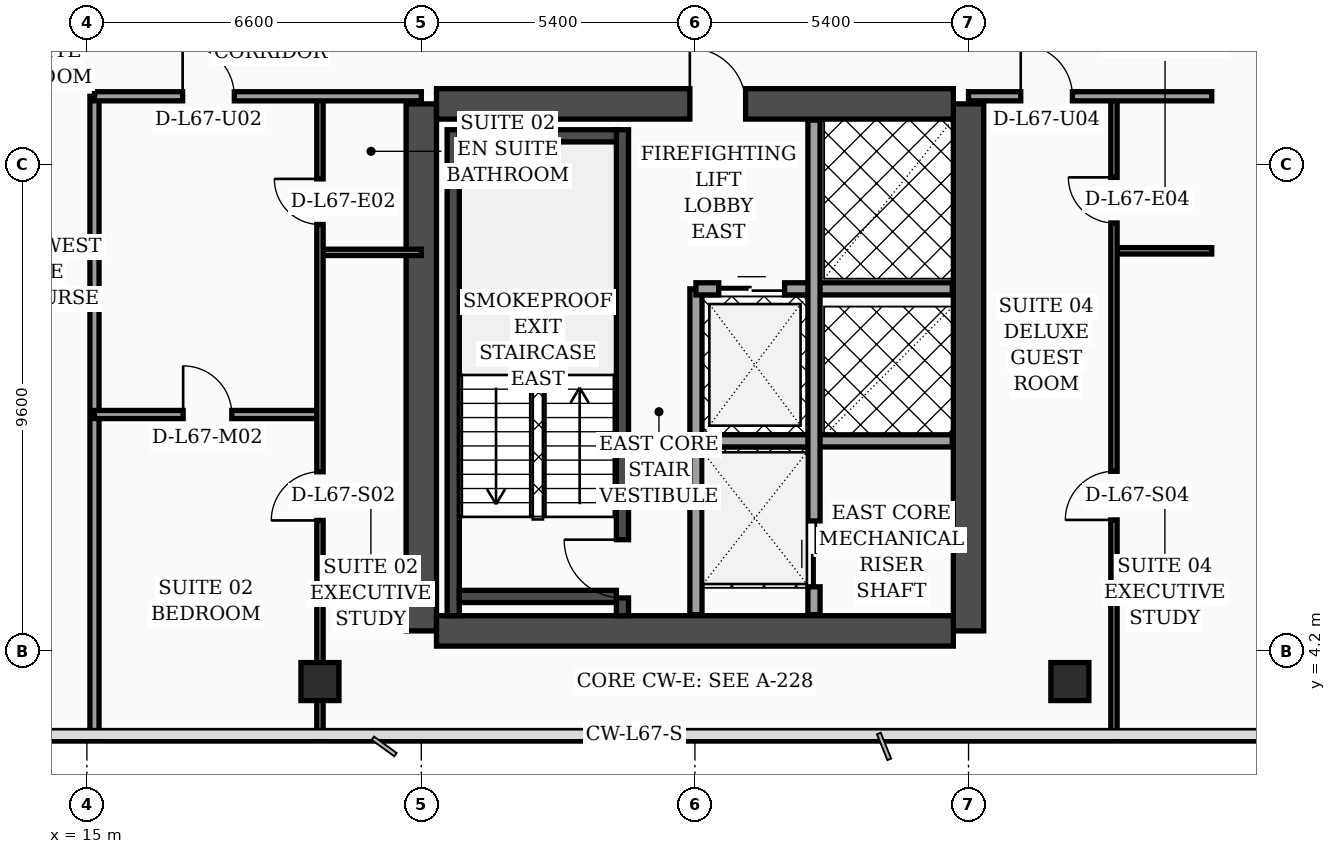
"""IFC4 building model, lengths in metres.
Left out: names, types, materials, properties, quantities, classifications, styles, units other than length and angle.
Written with IfcOpenShell. Run it as: python <this file> out.ifc"""

import sys

from ifc_helpers import new_model, si_unit, direction, frame, frame_2d, origin, origin_2d, place, context, subcontext, project, spatial, rectangle, hollow_rectangle, extrude, element, fill, save


model = new_model("IFC4")
c1 = context("Model", 3, precision=1e-05, world=origin(), true_north=direction((0.0, 1.0)))
c2 = subcontext(c1, "Body", "Model", "MODEL_VIEW")
j1 = project(units=[si_unit("LENGTHUNIT", "METRE"), si_unit("PLANEANGLEUNIT", "RADIAN")], contexts=[c1])
p1 = place(None, origin())
s1 = spatial("IfcSite", under=j1, at=p1, CompositionType="ELEMENT")
p2 = place(p1, origin())
s2 = spatial("IfcBuilding", under=s1, at=p2, CompositionType="ELEMENT")
p3 = place(p2, frame((0.0, 0.0, 271.1)))
s3 = spatial("IfcBuildingStorey", under=s2, at=p3, CompositionType="ELEMENT", Elevation=271.1)
for number, where, z_axis, x_axis in (
    (1, (21.6, 4.6, 0.0), (0.0, 0.0, 1.0), (0.0, 1.0, 0.0)),
    (2, (32.4, 4.6, 0.0), (0.0, 0.0, 1.0), (0.0, 1.0, 0.0)),
):
    element("IfcWall", number, at=place(p3, frame(where, z_axis=z_axis, x_axis=x_axis)), inside=s3, PredefinedType="SHEAR", context=c2, shape_type="SweptSolid", body=[
        extrude(rectangle(XDim=10.4, YDim=0.6, at=frame_2d((5.2, 0.0))), origin(), (0.0, 0.0, 1.0), 3.56),
    ])
p4 = place(p3, frame((21.9, 15.0, 0.0), z_axis=(0.0, 0.0, 1.0), x_axis=(1.0, 0.0, 0.0)))
e3 = element("IfcWall", 3, at=p4, inside=s3, PredefinedType="SHEAR", context=c2, shape_type="SweptSolid", body=[
    extrude(rectangle(XDim=10.2, YDim=0.6, at=frame_2d((5.1, 0.0))), origin(), (0.0, 0.0, 1.0), 3.56),
])
p5 = place(p4, frame((5.0, 0.0, 0.0)))
e4 = element("IfcOpeningElement", 4, at=p5, cuts=e3, PredefinedType="OPENING", context=c2, shape_type="SweptSolid", body=[
    extrude(rectangle(XDim=1.1, YDim=2.2, at=frame_2d((0.55, 1.1))), frame((0.0, 0.31, 0.0), z_axis=(0.0, -1.0, 0.0), x_axis=(1.0, 0.0, 0.0)), (0.0, 0.0, 1.0), 0.62),
])
p6 = place(p3, frame((21.9, 4.6, 0.0), z_axis=(0.0, 0.0, 1.0), x_axis=(1.0, 0.0, 0.0)))
e5 = element("IfcWall", 5, at=p6, inside=s3, PredefinedType="SHEAR", context=c2, shape_type="SweptSolid", body=[
    extrude(rectangle(XDim=10.2, YDim=0.6, at=frame_2d((5.1, 0.0))), origin(), (0.0, 0.0, 1.0), 3.56),
])
p7 = place(p3, frame((22.23, 4.9, 0.0), z_axis=(0.0, 0.0, 1.0), x_axis=(0.0, 1.0, 0.0)))
e6 = element("IfcWall", 6, at=p7, inside=s3, PredefinedType="SOLIDWALL", context=c2, shape_type="SweptSolid", body=[
    extrude(rectangle(XDim=9.59, YDim=0.24, at=frame_2d((4.795, 0.0))), origin(), (0.0, 0.0, 1.0), 3.56),
])
p8 = place(p3, frame((25.57, 4.9, 0.0), z_axis=(0.0, 0.0, 1.0), x_axis=(0.0, 1.0, 0.0)))
e7 = element("IfcWall", 7, at=p8, inside=s3, PredefinedType="SOLIDWALL", context=c2, shape_type="SweptSolid", body=[
    extrude(rectangle(XDim=9.59, YDim=0.24, at=frame_2d((4.795, 0.0))), origin(), (0.0, 0.0, 1.0), 3.56),
])
p9 = place(p8, frame((0.35, 0.0, 0.0)))
e8 = element("IfcOpeningElement", 8, at=p9, cuts=e7, PredefinedType="OPENING", context=c2, shape_type="SweptSolid", body=[
    extrude(rectangle(XDim=1.15, YDim=2.2, at=frame_2d((0.575, 1.1))), frame((0.0, 0.13, 0.0), z_axis=(0.0, -1.0, 0.0), x_axis=(1.0, 0.0, 0.0)), (0.0, 0.0, 1.0), 0.26),
])
for number, where, z_axis, x_axis in (
    (9, (22.35, 5.28, 0.0), (0.0, 0.0, 1.0), (1.0, 0.0, 0.0)),
    (10, (22.35, 14.37, 0.0), (0.0, 0.0, 1.0), (1.0, 0.0, 0.0)),
):
    element("IfcWall", number, at=place(p3, frame(where, z_axis=z_axis, x_axis=x_axis)), inside=s3, PredefinedType="SOLIDWALL", context=c2, shape_type="SweptSolid", body=[
        extrude(rectangle(XDim=3.1, YDim=0.24, at=frame_2d((1.55, 0.0))), origin(), (0.0, 0.0, 1.0), 3.56),
    ])
for number, where, z_axis, x_axis in (
    (11, (19.6, 3.6, 0.0), (0.0, 0.0, 1.0), (1.0, 0.0, 0.0)),
    (12, (34.4, 3.6, 0.0), (0.0, 0.0, 1.0), (1.0, 0.0, 0.0)),
):
    element("IfcColumn", number, at=place(p3, frame(where, z_axis=z_axis, x_axis=x_axis)), inside=s3, PredefinedType="COLUMN", context=c2, shape_type="SweptSolid", body=[
        extrude(hollow_rectangle(XDim=0.75, YDim=0.75, WallThickness=0.032, at=origin_2d()), origin(), (0.0, 0.0, 1.0), 3.56),
    ])
p10 = place(p3, frame((43.83, 5.505, 0.0), z_axis=(0.0, 0.0, 1.0), x_axis=(-0.300509063924, 0.953778958931, 0.0)))
e13 = element("IfcWall", 13, at=p10, inside=s3, PredefinedType="SOLIDWALL", context=c2, shape_type="SweptSolid", body=[
    extrude(rectangle(XDim=30.814, YDim=0.32, at=frame_2d((15.407, 0.0))), origin(), (0.0, 0.0, 1.0), 3.56),
])
p11 = place(p10, frame((10.199, 0.0, 0.0)))
e14 = element("IfcOpeningElement", 14, at=p11, cuts=e13, PredefinedType="OPENING", context=c2, shape_type="SweptSolid", body=[
    extrude(rectangle(XDim=1.4, YDim=2.25, at=frame_2d((0.7, 1.125))), frame((0.0, 0.17, 0.0), z_axis=(0.0, -1.0, 0.0), x_axis=(1.0, 0.0, 0.0)), (0.0, 0.0, 1.0), 0.34),
])
p12 = place(p10, frame((4.437, 0.0, 0.7)))
e15 = element("IfcOpeningElement", 15, at=p12, cuts=e13, PredefinedType="OPENING", context=c2, shape_type="SweptSolid", body=[
    extrude(rectangle(XDim=1.6, YDim=1.65, at=frame_2d((0.8, 0.825))), frame((0.0, 0.17, 0.0), z_axis=(0.0, -1.0, 0.0), x_axis=(1.0, 0.0, 0.0)), (0.0, 0.0, 1.0), 0.34),
])
p13 = place(p10, frame((18.696, 0.0, 0.7)))
e16 = element("IfcOpeningElement", 16, at=p13, cuts=e13, PredefinedType="OPENING", context=c2, shape_type="SweptSolid", body=[
    extrude(rectangle(XDim=1.6, YDim=1.65, at=frame_2d((0.8, 0.825))), frame((0.0, 0.17, 0.0), z_axis=(0.0, -1.0, 0.0), x_axis=(1.0, 0.0, 0.0)), (0.0, 0.0, 1.0), 0.34),
])
p14 = place(p10, frame((1.6, 0.0, 0.75)))
e17 = element("IfcOpeningElement", 17, at=p14, cuts=e13, PredefinedType="OPENING", context=c2, shape_type="SweptSolid", body=[
    extrude(rectangle(XDim=1.5, YDim=1.6, at=frame_2d((0.75, 0.8))), frame((0.0, 0.17, 0.0), z_axis=(0.0, -1.0, 0.0), x_axis=(1.0, 0.0, 0.0)), (0.0, 0.0, 1.0), 0.34),
])
p15 = place(p10, frame((7.8, 0.0, 0.75)))
e18 = element("IfcOpeningElement", 18, at=p15, cuts=e13, PredefinedType="OPENING", context=c2, shape_type="SweptSolid", body=[
    extrude(rectangle(XDim=1.5, YDim=1.6, at=frame_2d((0.75, 0.8))), frame((0.0, 0.17, 0.0), z_axis=(0.0, -1.0, 0.0), x_axis=(1.0, 0.0, 0.0)), (0.0, 0.0, 1.0), 0.34),
])
p16 = place(p10, frame((14.0, 0.0, 0.75)))
e19 = element("IfcOpeningElement", 19, at=p16, cuts=e13, PredefinedType="OPENING", context=c2, shape_type="SweptSolid", body=[
    extrude(rectangle(XDim=1.5, YDim=1.6, at=frame_2d((0.75, 0.8))), frame((0.0, 0.17, 0.0), z_axis=(0.0, -1.0, 0.0), x_axis=(1.0, 0.0, 0.0)), (0.0, 0.0, 1.0), 0.34),
])
p17 = place(p10, frame((16.55, 0.0, 0.75)))
e20 = element("IfcOpeningElement", 20, at=p17, cuts=e13, PredefinedType="OPENING", context=c2, shape_type="SweptSolid", body=[
    extrude(rectangle(XDim=1.5, YDim=1.6, at=frame_2d((0.75, 0.8))), frame((0.0, 0.17, 0.0), z_axis=(0.0, -1.0, 0.0), x_axis=(1.0, 0.0, 0.0)), (0.0, 0.0, 1.0), 0.34),
])
p18 = place(p10, frame((20.75, 0.0, 0.75)))
e21 = element("IfcOpeningElement", 21, at=p18, cuts=e13, PredefinedType="OPENING", context=c2, shape_type="SweptSolid", body=[
    extrude(rectangle(XDim=1.5, YDim=1.6, at=frame_2d((0.75, 0.8))), frame((0.0, 0.17, 0.0), z_axis=(0.0, -1.0, 0.0), x_axis=(1.0, 0.0, 0.0)), (0.0, 0.0, 1.0), 0.34),
])
p19 = place(p10, frame((23.3, 0.0, 0.75)))
e22 = element("IfcOpeningElement", 22, at=p19, cuts=e13, PredefinedType="OPENING", context=c2, shape_type="SweptSolid", body=[
    extrude(rectangle(XDim=1.5, YDim=1.6, at=frame_2d((0.75, 0.8))), frame((0.0, 0.17, 0.0), z_axis=(0.0, -1.0, 0.0), x_axis=(1.0, 0.0, 0.0)), (0.0, 0.0, 1.0), 0.34),
])
p20 = place(p10, frame((26.4, 0.0, 0.75)))
e23 = element("IfcOpeningElement", 23, at=p20, cuts=e13, PredefinedType="OPENING", context=c2, shape_type="SweptSolid", body=[
    extrude(rectangle(XDim=1.5, YDim=1.6, at=frame_2d((0.75, 0.8))), frame((0.0, 0.17, 0.0), z_axis=(0.0, -1.0, 0.0), x_axis=(1.0, 0.0, 0.0)), (0.0, 0.0, 1.0), 0.34),
])
p21 = place(p3, frame((27.02, 4.92, 0.0), z_axis=(0.0, 0.0, 1.0), x_axis=(0.0, 1.0, 0.0)))
e24 = element("IfcWall", 24, at=p21, inside=s3, PredefinedType="SOLIDWALL", context=c2, shape_type="SweptSolid", body=[
    extrude(rectangle(XDim=6.43, YDim=0.24, at=frame_2d((3.215, 0.0))), origin(), (0.0, 0.0, 1.0), 3.56),
])
p22 = place(p3, frame((27.02, 11.35, 0.0), z_axis=(0.0, 0.0, 1.0), x_axis=(1.0, 0.0, 0.0)))
e25 = element("IfcWall", 25, at=p22, inside=s3, PredefinedType="SOLIDWALL", context=c2, shape_type="SweptSolid", body=[
    extrude(rectangle(XDim=5.06, YDim=0.24, at=frame_2d((2.53, 0.0))), origin(), (0.0, 0.0, 1.0), 3.56),
])
p23 = place(p22, frame((0.45, 0.0, 0.0)))
e26 = element("IfcOpeningElement", 26, at=p23, cuts=e25, PredefinedType="OPENING", context=c2, shape_type="SweptSolid", body=[
    extrude(rectangle(XDim=1.3, YDim=2.35, at=frame_2d((0.65, 1.175))), frame((0.0, 0.13, 0.0), z_axis=(0.0, -1.0, 0.0), x_axis=(1.0, 0.0, 0.0)), (0.0, 0.0, 1.0), 0.26),
])
p24 = place(p3, frame((27.02, 8.35, 0.0), z_axis=(0.0, 0.0, 1.0), x_axis=(1.0, 0.0, 0.0)))
e27 = element("IfcWall", 27, at=p24, inside=s3, PredefinedType="SOLIDWALL", context=c2, shape_type="SweptSolid", body=[
    extrude(rectangle(XDim=5.06, YDim=0.24, at=frame_2d((2.53, 0.0))), origin(), (0.0, 0.0, 1.0), 3.56),
])
p25 = place(p3, frame((29.35, 4.92, 0.0), z_axis=(0.0, 0.0, 1.0), x_axis=(0.0, 1.0, 0.0)))
e28 = element("IfcWall", 28, at=p25, inside=s3, PredefinedType="SOLIDWALL", context=c2, shape_type="SweptSolid", body=[
    extrude(rectangle(XDim=9.76, YDim=0.24, at=frame_2d((4.88, 0.0))), origin(), (0.0, 0.0, 1.0), 3.56),
])
p26 = place(p25, frame((0.55, 0.0, 0.0)))
e29 = element("IfcOpeningElement", 29, at=p26, cuts=e28, PredefinedType="OPENING", context=c2, shape_type="SweptSolid", body=[
    extrude(rectangle(XDim=1.3, YDim=2.35, at=frame_2d((0.65, 1.175))), frame((0.0, 0.13, 0.0), z_axis=(0.0, -1.0, 0.0), x_axis=(1.0, 0.0, 0.0)), (0.0, 0.0, 1.0), 0.26),
])
p27 = place(p3, frame((15.15, 2.44, 0.0), z_axis=(0.0, 0.0, 1.0), x_axis=(0.0, 1.0, 0.0)))
e30 = element("IfcWall", 30, at=p27, inside=s3, PredefinedType="PARTITIONING", context=c2, shape_type="SweptSolid", body=[
    extrude(rectangle(XDim=12.71, YDim=0.18, at=frame_2d((6.355, 0.0))), origin(), (0.0, 0.0, 1.0), 3.09),
])
p28 = place(p3, frame((19.6, 12.07, 0.0), z_axis=(0.0, 0.0, 1.0), x_axis=(1.0, 0.0, 0.0)))
e31 = element("IfcWall", 31, at=p28, inside=s3, PredefinedType="PARTITIONING", context=c2, shape_type="SweptSolid", body=[
    extrude(rectangle(XDim=2.0, YDim=0.125, at=frame_2d((1.0, 0.0))), origin(), (0.0, 0.0, 1.0), 3.56),
])
p29 = place(p3, frame((15.15, 8.87, 0.0), z_axis=(0.0, 0.0, 1.0), x_axis=(1.0, 0.0, 0.0)))
e32 = element("IfcWall", 32, at=p29, inside=s3, PredefinedType="PARTITIONING", context=c2, shape_type="SweptSolid", body=[
    extrude(rectangle(XDim=4.45, YDim=0.16, at=frame_2d((2.225, 0.0))), origin(), (0.0, 0.0, 1.0), 3.56),
])
p30 = place(p29, frame((1.75, 0.0, 0.0)))
e33 = element("IfcOpeningElement", 33, at=p30, cuts=e32, PredefinedType="OPENING", context=c2, shape_type="SweptSolid", body=[
    extrude(rectangle(XDim=0.96, YDim=2.2, at=frame_2d((0.48, 1.1))), frame((0.0, 0.09, 0.0), z_axis=(0.0, -1.0, 0.0), x_axis=(1.0, 0.0, 0.0)), (0.0, 0.0, 1.0), 0.18),
])
p31 = place(p3, frame((19.6, 2.44, 0.0), z_axis=(0.0, 0.0, 1.0), x_axis=(0.0, 1.0, 0.0)))
e34 = element("IfcWall", 34, at=p31, inside=s3, PredefinedType="PARTITIONING", context=c2, shape_type="SweptSolid", body=[
    extrude(rectangle(XDim=12.71, YDim=0.125, at=frame_2d((6.355, 0.0))), origin(), (0.0, 0.0, 1.0), 2.59),
])
p32 = place(p31, frame((4.34, 0.0, 0.0)))
e35 = element("IfcOpeningElement", 35, at=p32, cuts=e34, PredefinedType="OPENING", context=c2, shape_type="SweptSolid", body=[
    extrude(rectangle(XDim=0.96, YDim=2.2, at=frame_2d((0.48, 1.1))), frame((0.0, 0.073, 0.0), z_axis=(0.0, -1.0, 0.0), x_axis=(1.0, 0.0, 0.0)), (0.0, 0.0, 1.0), 0.145),
])
p33 = place(p31, frame((10.18, 0.0, 0.0)))
e36 = element("IfcOpeningElement", 36, at=p33, cuts=e34, PredefinedType="OPENING", context=c2, shape_type="SweptSolid", body=[
    extrude(rectangle(XDim=0.9, YDim=2.15, at=frame_2d((0.45, 1.075))), frame((0.0, 0.073, 0.0), z_axis=(0.0, -1.0, 0.0), x_axis=(1.0, 0.0, 0.0)), (0.0, 0.0, 1.0), 0.145),
])
p34 = place(p3, frame((15.15, 15.15, 0.0), z_axis=(0.0, 0.0, 1.0), x_axis=(1.0, 0.0, 0.0)))
e37 = element("IfcWall", 37, at=p34, inside=s3, PredefinedType="PARTITIONING", context=c2, shape_type="SweptSolid", body=[
    extrude(rectangle(XDim=6.45, YDim=0.18, at=frame_2d((3.225, 0.0))), origin(), (0.0, 0.0, 1.0), 2.59),
])
p35 = place(p34, frame((1.74, 0.0, 0.0)))
e38 = element("IfcOpeningElement", 38, at=p35, cuts=e37, PredefinedType="OPENING", context=c2, shape_type="SweptSolid", body=[
    extrude(rectangle(XDim=1.02, YDim=2.2, at=frame_2d((0.51, 1.1))), frame((0.0, 0.1, 0.0), z_axis=(0.0, -1.0, 0.0), x_axis=(1.0, 0.0, 0.0)), (0.0, 0.0, 1.0), 0.2),
])
p36 = place(p3, frame((35.27, 12.1, 0.0), z_axis=(0.0, 0.0, 1.0), x_axis=(1.0, 0.0, 0.0)))
e39 = element("IfcWall", 39, at=p36, inside=s3, PredefinedType="PARTITIONING", context=c2, shape_type="SweptSolid", body=[
    extrude(rectangle(XDim=1.93, YDim=0.125, at=frame_2d((0.965, 0.0))), origin(), (0.0, 0.0, 1.0), 3.56),
])
p37 = place(p3, frame((35.27, 2.44, 0.0), z_axis=(0.0, 0.0, 1.0), x_axis=(0.0, 1.0, 0.0)))
e40 = element("IfcWall", 40, at=p37, inside=s3, PredefinedType="PARTITIONING", context=c2, shape_type="SweptSolid", body=[
    extrude(rectangle(XDim=12.71, YDim=0.125, at=frame_2d((6.355, 0.0))), origin(), (0.0, 0.0, 1.0), 2.99),
])
p38 = place(p37, frame((4.35, 0.0, 0.0)))
e41 = element("IfcOpeningElement", 41, at=p38, cuts=e40, PredefinedType="OPENING", context=c2, shape_type="SweptSolid", body=[
    extrude(rectangle(XDim=0.96, YDim=2.2, at=frame_2d((0.48, 1.1))), frame((0.0, 0.073, 0.0), z_axis=(0.0, -1.0, 0.0), x_axis=(1.0, 0.0, 0.0)), (0.0, 0.0, 1.0), 0.145),
])
p39 = place(p37, frame((10.21, 0.0, 0.0)))
e42 = element("IfcOpeningElement", 42, at=p39, cuts=e40, PredefinedType="OPENING", context=c2, shape_type="SweptSolid", body=[
    extrude(rectangle(XDim=0.9, YDim=2.15, at=frame_2d((0.45, 1.075))), frame((0.0, 0.073, 0.0), z_axis=(0.0, -1.0, 0.0), x_axis=(1.0, 0.0, 0.0)), (0.0, 0.0, 1.0), 0.145),
])
p40 = place(p3, frame((32.4, 15.15, 0.0), z_axis=(0.0, 0.0, 1.0), x_axis=(1.0, 0.0, 0.0)))
e43 = element("IfcWall", 43, at=p40, inside=s3, PredefinedType="PARTITIONING", context=c2, shape_type="SweptSolid", body=[
    extrude(rectangle(XDim=4.8, YDim=0.18, at=frame_2d((2.4, 0.0))), origin(), (0.0, 0.0, 1.0), 2.99),
])
p41 = place(p40, frame((1.03, 0.0, 0.0)))
e44 = element("IfcOpeningElement", 44, at=p41, cuts=e43, PredefinedType="OPENING", context=c2, shape_type="SweptSolid", body=[
    extrude(rectangle(XDim=1.02, YDim=2.2, at=frame_2d((0.51, 1.1))), frame((0.0, 0.1, 0.0), z_axis=(0.0, -1.0, 0.0), x_axis=(1.0, 0.0, 0.0)), (0.0, 0.0, 1.0), 0.2),
])
p42 = place(p23, origin())
e45 = element("IfcDoor", 45, at=p42, inside=s3, OperationType="DOUBLE_DOOR_SLIDING", PredefinedType="DOOR", context=c2, shape_type="SweptSolid", body=[
    extrude(rectangle(XDim=1.3, YDim=2.35, at=frame_2d((0.65, 1.175))), frame((0.0, 0.025, 0.0), z_axis=(0.0, -1.0, 0.0), x_axis=(1.0, 0.0, 0.0)), (0.0, 0.0, 1.0), 0.05),
])
fill(e26, e45)
p43 = place(p26, origin())
e46 = element("IfcDoor", 46, at=p43, inside=s3, OperationType="DOUBLE_DOOR_SLIDING", PredefinedType="DOOR", context=c2, shape_type="SweptSolid", body=[
    extrude(rectangle(XDim=1.3, YDim=2.35, at=frame_2d((0.65, 1.175))), frame((0.0, 0.025, 0.0), z_axis=(0.0, -1.0, 0.0), x_axis=(1.0, 0.0, 0.0)), (0.0, 0.0, 1.0), 0.05),
])
fill(e29, e46)
p44 = place(p30, origin())
e47 = element("IfcDoor", 47, at=p44, inside=s3, OperationType="SINGLE_SWING_LEFT", PredefinedType="DOOR", context=c2, shape_type="SweptSolid", body=[
    extrude(rectangle(XDim=0.96, YDim=2.2, at=frame_2d((0.48, 1.1))), frame((0.0, 0.025, 0.0), z_axis=(0.0, -1.0, 0.0), x_axis=(1.0, 0.0, 0.0)), (0.0, 0.0, 1.0), 0.05),
])
fill(e33, e47)
p45 = place(p32, origin())
e48 = element("IfcDoor", 48, at=p45, inside=s3, OperationType="SINGLE_SWING_LEFT", PredefinedType="DOOR", context=c2, shape_type="SweptSolid", body=[
    extrude(rectangle(XDim=0.96, YDim=2.2, at=frame_2d((0.48, 1.1))), frame((0.0, 0.025, 0.0), z_axis=(0.0, -1.0, 0.0), x_axis=(1.0, 0.0, 0.0)), (0.0, 0.0, 1.0), 0.05),
])
fill(e35, e48)
p46 = place(p33, origin())
e49 = element("IfcDoor", 49, at=p46, inside=s3, OperationType="SINGLE_SWING_RIGHT", PredefinedType="DOOR", context=c2, shape_type="SweptSolid", body=[
    extrude(rectangle(XDim=0.9, YDim=2.15, at=frame_2d((0.45, 1.075))), frame((0.0, 0.025, 0.0), z_axis=(0.0, -1.0, 0.0), x_axis=(1.0, 0.0, 0.0)), (0.0, 0.0, 1.0), 0.05),
])
fill(e36, e49)
p47 = place(p35, origin())
e50 = element("IfcDoor", 50, at=p47, inside=s3, OperationType="SINGLE_SWING_LEFT", PredefinedType="DOOR", context=c2, shape_type="SweptSolid", body=[
    extrude(rectangle(XDim=1.02, YDim=2.2, at=frame_2d((0.51, 1.1))), frame((0.0, 0.025, 0.0), z_axis=(0.0, -1.0, 0.0), x_axis=(1.0, 0.0, 0.0)), (0.0, 0.0, 1.0), 0.05),
])
fill(e38, e50)
p48 = place(p38, origin())
e51 = element("IfcDoor", 51, at=p48, inside=s3, OperationType="SINGLE_SWING_LEFT", PredefinedType="DOOR", context=c2, shape_type="SweptSolid", body=[
    extrude(rectangle(XDim=0.96, YDim=2.2, at=frame_2d((0.48, 1.1))), frame((0.0, 0.025, 0.0), z_axis=(0.0, -1.0, 0.0), x_axis=(1.0, 0.0, 0.0)), (0.0, 0.0, 1.0), 0.05),
])
fill(e41, e51)
p49 = place(p39, origin())
e52 = element("IfcDoor", 52, at=p49, inside=s3, OperationType="SINGLE_SWING_RIGHT", PredefinedType="DOOR", context=c2, shape_type="SweptSolid", body=[
    extrude(rectangle(XDim=0.9, YDim=2.15, at=frame_2d((0.45, 1.075))), frame((0.0, 0.025, 0.0), z_axis=(0.0, -1.0, 0.0), x_axis=(1.0, 0.0, 0.0)), (0.0, 0.0, 1.0), 0.05),
])
fill(e42, e52)
p50 = place(p41, origin())
e53 = element("IfcDoor", 53, at=p50, inside=s3, OperationType="SINGLE_SWING_LEFT", PredefinedType="DOOR", context=c2, shape_type="SweptSolid", body=[
    extrude(rectangle(XDim=1.02, YDim=2.2, at=frame_2d((0.51, 1.1))), frame((0.0, 0.025, 0.0), z_axis=(0.0, -1.0, 0.0), x_axis=(1.0, 0.0, 0.0)), (0.0, 0.0, 1.0), 0.05),
])
fill(e44, e53)
p51 = place(p9, origin())
e54 = element("IfcDoor", 54, at=p51, inside=s3, OperationType="SINGLE_SWING_RIGHT", PredefinedType="DOOR", context=c2, shape_type="SweptSolid", body=[
    extrude(rectangle(XDim=1.15, YDim=2.2, at=frame_2d((0.575, 1.1))), frame((0.0, 0.025, 0.0), z_axis=(0.0, -1.0, 0.0), x_axis=(1.0, 0.0, 0.0)), (0.0, 0.0, 1.0), 0.05),
])
fill(e8, e54)
p52 = place(p5, origin())
e55 = element("IfcDoor", 55, at=p52, inside=s3, OperationType="SINGLE_SWING_LEFT", PredefinedType="DOOR", context=c2, shape_type="SweptSolid", body=[
    extrude(rectangle(XDim=1.1, YDim=2.2, at=frame_2d((0.55, 1.1))), frame((0.0, 0.025, 0.0), z_axis=(0.0, -1.0, 0.0), x_axis=(1.0, 0.0, 0.0)), (0.0, 0.0, 1.0), 0.05),
])
fill(e4, e55)
save(model, sys.argv[1])
